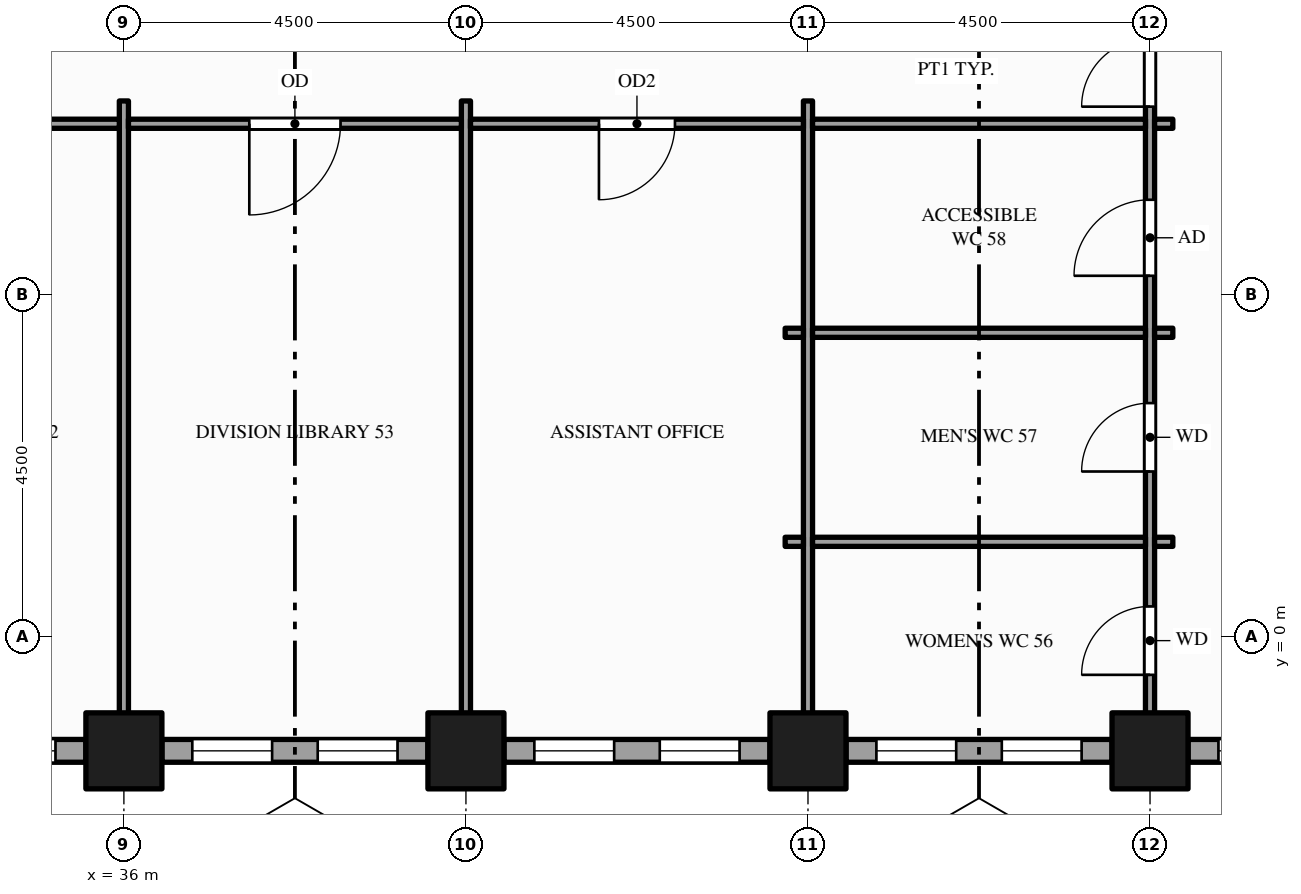
"""IFC4 building model, lengths in metres.
Left out: names, types, materials, properties, quantities, classifications, styles, units other than length and angle.
Written with IfcOpenShell. Run it as: python <this file> out.ifc"""

import sys

from ifc_helpers import new_model, si_unit, direction, frame, frame_2d, origin, origin_2d, place, context, subcontext, project, spatial, rectangle, hollow_rectangle, extrude, element, fill, save


model = new_model("IFC4")
c1 = context("Model", 3, precision=1e-05, world=origin(), true_north=direction((0.0, 1.0)))
c2 = subcontext(c1, "Body", "Model", "MODEL_VIEW")
j1 = project(units=[si_unit("LENGTHUNIT", "METRE"), si_unit("PLANEANGLEUNIT", "RADIAN")], contexts=[c1])
p1 = place(None, origin())
s1 = spatial("IfcSite", under=j1, at=p1, CompositionType="ELEMENT")
p2 = place(p1, origin())
s2 = spatial("IfcBuilding", under=s1, at=p2, CompositionType="ELEMENT")
p3 = place(p2, frame((0.0, 0.0, 107.0)))
s3 = spatial("IfcBuildingStorey", under=s2, at=p3, CompositionType="ELEMENT", Elevation=107.0)
for number, where, z_axis, x_axis in (
    (1, (36.0, -1.5, -0.15), (0.0, 0.0, 1.0), (1.0, 0.0, 0.0)),
    (2, (40.5, -1.5, -0.15), (0.0, 0.0, 1.0), (1.0, 0.0, 0.0)),
    (3, (45.0, -1.5, -0.15), (0.0, 0.0, 1.0), (1.0, 0.0, 0.0)),
    (4, (49.5, -1.5, -0.15), (0.0, 0.0, 1.0), (1.0, 0.0, 0.0)),
):
    element("IfcColumn", number, at=place(p3, frame(where, z_axis=z_axis, x_axis=x_axis)), inside=s3, PredefinedType="COLUMN", context=c2, shape_type="SweptSolid", body=[
        extrude(hollow_rectangle(XDim=1.0, YDim=1.0, WallThickness=0.05, at=origin_2d()), origin(), (0.0, 0.0, 1.0), 4.0),
    ])
p4 = place(p3, frame((32.0, -1.5, 0.0), z_axis=(0.0, 0.0, 1.0), x_axis=(1.0, 0.0, 0.0)))
e5 = element("IfcWall", 5, at=p4, inside=s3, PredefinedType="STANDARD", context=c2, shape_type="SweptSolid", body=[
    extrude(rectangle(XDim=3.5, YDim=0.3, at=frame_2d((1.75, 0.0))), origin(), (0.0, 0.0, 1.0), 3.154),
])
p5 = place(p4, frame((0.4, 0.0, 0.9)))
e6 = element("IfcOpeningElement", 6, at=p5, cuts=e5, PredefinedType="OPENING", context=c2, shape_type="SweptSolid", body=[
    extrude(rectangle(XDim=1.05, YDim=2.0, at=frame_2d((0.525, 1.0))), frame((0.0, 0.16, 0.0), z_axis=(0.0, -1.0, 0.0), x_axis=(1.0, 0.0, 0.0)), (0.0, 0.0, 1.0), 0.32),
])
p6 = place(p4, frame((2.05, 0.0, 0.9)))
e7 = element("IfcOpeningElement", 7, at=p6, cuts=e5, PredefinedType="OPENING", context=c2, shape_type="SweptSolid", body=[
    extrude(rectangle(XDim=1.05, YDim=2.0, at=frame_2d((0.525, 1.0))), frame((0.0, 0.16, 0.0), z_axis=(0.0, -1.0, 0.0), x_axis=(1.0, 0.0, 0.0)), (0.0, 0.0, 1.0), 0.32),
])
p7 = place(p3, frame((36.5, -1.5, 0.0), z_axis=(0.0, 0.0, 1.0), x_axis=(1.0, 0.0, 0.0)))
e8 = element("IfcWall", 8, at=p7, inside=s3, PredefinedType="STANDARD", context=c2, shape_type="SweptSolid", body=[
    extrude(rectangle(XDim=3.5, YDim=0.3, at=frame_2d((1.75, 0.0))), origin(), (0.0, 0.0, 1.0), 3.154),
])
p8 = place(p7, frame((0.4, 0.0, 0.9)))
e9 = element("IfcOpeningElement", 9, at=p8, cuts=e8, PredefinedType="OPENING", context=c2, shape_type="SweptSolid", body=[
    extrude(rectangle(XDim=1.05, YDim=2.0, at=frame_2d((0.525, 1.0))), frame((0.0, 0.16, 0.0), z_axis=(0.0, -1.0, 0.0), x_axis=(1.0, 0.0, 0.0)), (0.0, 0.0, 1.0), 0.32),
])
p9 = place(p7, frame((2.05, 0.0, 0.9)))
e10 = element("IfcOpeningElement", 10, at=p9, cuts=e8, PredefinedType="OPENING", context=c2, shape_type="SweptSolid", body=[
    extrude(rectangle(XDim=1.05, YDim=2.0, at=frame_2d((0.525, 1.0))), frame((0.0, 0.16, 0.0), z_axis=(0.0, -1.0, 0.0), x_axis=(1.0, 0.0, 0.0)), (0.0, 0.0, 1.0), 0.32),
])
p10 = place(p3, frame((41.0, -1.5, 0.0), z_axis=(0.0, 0.0, 1.0), x_axis=(1.0, 0.0, 0.0)))
e11 = element("IfcWall", 11, at=p10, inside=s3, PredefinedType="STANDARD", context=c2, shape_type="SweptSolid", body=[
    extrude(rectangle(XDim=3.5, YDim=0.3, at=frame_2d((1.75, 0.0))), origin(), (0.0, 0.0, 1.0), 3.154),
])
p11 = place(p10, frame((0.4, 0.0, 0.9)))
e12 = element("IfcOpeningElement", 12, at=p11, cuts=e11, PredefinedType="OPENING", context=c2, shape_type="SweptSolid", body=[
    extrude(rectangle(XDim=1.05, YDim=2.0, at=frame_2d((0.525, 1.0))), frame((0.0, 0.16, 0.0), z_axis=(0.0, -1.0, 0.0), x_axis=(1.0, 0.0, 0.0)), (0.0, 0.0, 1.0), 0.32),
])
p12 = place(p10, frame((2.05, 0.0, 0.9)))
e13 = element("IfcOpeningElement", 13, at=p12, cuts=e11, PredefinedType="OPENING", context=c2, shape_type="SweptSolid", body=[
    extrude(rectangle(XDim=1.05, YDim=2.0, at=frame_2d((0.525, 1.0))), frame((0.0, 0.16, 0.0), z_axis=(0.0, -1.0, 0.0), x_axis=(1.0, 0.0, 0.0)), (0.0, 0.0, 1.0), 0.32),
])
p13 = place(p3, frame((45.5, -1.5, 0.0), z_axis=(0.0, 0.0, 1.0), x_axis=(1.0, 0.0, 0.0)))
e14 = element("IfcWall", 14, at=p13, inside=s3, PredefinedType="STANDARD", context=c2, shape_type="SweptSolid", body=[
    extrude(rectangle(XDim=3.5, YDim=0.3, at=frame_2d((1.75, 0.0))), origin(), (0.0, 0.0, 1.0), 3.154),
])
p14 = place(p13, frame((0.4, 0.0, 0.9)))
e15 = element("IfcOpeningElement", 15, at=p14, cuts=e14, PredefinedType="OPENING", context=c2, shape_type="SweptSolid", body=[
    extrude(rectangle(XDim=1.05, YDim=2.0, at=frame_2d((0.525, 1.0))), frame((0.0, 0.16, 0.0), z_axis=(0.0, -1.0, 0.0), x_axis=(1.0, 0.0, 0.0)), (0.0, 0.0, 1.0), 0.32),
])
p15 = place(p13, frame((2.05, 0.0, 0.9)))
e16 = element("IfcOpeningElement", 16, at=p15, cuts=e14, PredefinedType="OPENING", context=c2, shape_type="SweptSolid", body=[
    extrude(rectangle(XDim=1.05, YDim=2.0, at=frame_2d((0.525, 1.0))), frame((0.0, 0.16, 0.0), z_axis=(0.0, -1.0, 0.0), x_axis=(1.0, 0.0, 0.0)), (0.0, 0.0, 1.0), 0.32),
])
p16 = place(p3, frame((50.0, -1.5, 0.0), z_axis=(0.0, 0.0, 1.0), x_axis=(1.0, 0.0, 0.0)))
e17 = element("IfcWall", 17, at=p16, inside=s3, PredefinedType="STANDARD", context=c2, shape_type="SweptSolid", body=[
    extrude(rectangle(XDim=3.5, YDim=0.3, at=frame_2d((1.75, 0.0))), origin(), (0.0, 0.0, 1.0), 3.154),
])
p17 = place(p16, frame((0.4, 0.0, 0.9)))
e18 = element("IfcOpeningElement", 18, at=p17, cuts=e17, PredefinedType="OPENING", context=c2, shape_type="SweptSolid", body=[
    extrude(rectangle(XDim=1.05, YDim=2.0, at=frame_2d((0.525, 1.0))), frame((0.0, 0.16, 0.0), z_axis=(0.0, -1.0, 0.0), x_axis=(1.0, 0.0, 0.0)), (0.0, 0.0, 1.0), 0.32),
])
p18 = place(p16, frame((2.05, 0.0, 0.9)))
e19 = element("IfcOpeningElement", 19, at=p18, cuts=e17, PredefinedType="OPENING", context=c2, shape_type="SweptSolid", body=[
    extrude(rectangle(XDim=1.05, YDim=2.0, at=frame_2d((0.525, 1.0))), frame((0.0, 0.16, 0.0), z_axis=(0.0, -1.0, 0.0), x_axis=(1.0, 0.0, 0.0)), (0.0, 0.0, 1.0), 0.32),
])
for number, where, z_axis, x_axis in (
    (20, (36.0, -1.35, 0.0), (0.0, 0.0, 1.0), (0.0, 1.0, 0.0)),
    (21, (40.5, -1.35, 0.0), (0.0, 0.0, 1.0), (0.0, 1.0, 0.0)),
    (22, (45.0, -1.35, 0.0), (0.0, 0.0, 1.0), (0.0, 1.0, 0.0)),
):
    element("IfcWall", number, at=place(p3, frame(where, z_axis=z_axis, x_axis=x_axis)), inside=s3, PredefinedType="PARTITIONING", context=c2, shape_type="SweptSolid", body=[
        extrude(rectangle(XDim=8.4, YDim=0.12, at=frame_2d((4.2, 0.0))), origin(), (0.0, 0.0, 1.0), 2.938),
    ])
p19 = place(p3, frame((49.5, -1.35, 0.0), z_axis=(0.0, 0.0, 1.0), x_axis=(0.0, 1.0, 0.0)))
e23 = element("IfcWall", 23, at=p19, inside=s3, PredefinedType="PARTITIONING", context=c2, shape_type="SweptSolid", body=[
    extrude(rectangle(XDim=22.2, YDim=0.12, at=frame_2d((11.1, 0.0))), origin(), (0.0, 0.0, 1.0), 2.938),
])
p20 = place(p19, frame((8.325, 0.0, 0.0)))
e24 = element("IfcOpeningElement", 24, at=p20, cuts=e23, PredefinedType="OPENING", context=c2, shape_type="SweptSolid", body=[
    extrude(rectangle(XDim=1.8, YDim=2.1, at=frame_2d((0.9, 1.05))), frame((0.0, 0.07, 0.0), z_axis=(0.0, -1.0, 0.0), x_axis=(1.0, 0.0, 0.0)), (0.0, 0.0, 1.0), 0.14),
])
p21 = place(p19, frame((0.85, 0.0, 0.0)))
e25 = element("IfcOpeningElement", 25, at=p21, cuts=e23, PredefinedType="OPENING", context=c2, shape_type="SweptSolid", body=[
    extrude(rectangle(XDim=0.9, YDim=2.1, at=frame_2d((0.45, 1.05))), frame((0.0, 0.07, 0.0), z_axis=(0.0, -1.0, 0.0), x_axis=(1.0, 0.0, 0.0)), (0.0, 0.0, 1.0), 0.14),
])
p22 = place(p19, frame((3.525, 0.0, 0.0)))
e26 = element("IfcOpeningElement", 26, at=p22, cuts=e23, PredefinedType="OPENING", context=c2, shape_type="SweptSolid", body=[
    extrude(rectangle(XDim=0.9, YDim=2.1, at=frame_2d((0.45, 1.05))), frame((0.0, 0.07, 0.0), z_axis=(0.0, -1.0, 0.0), x_axis=(1.0, 0.0, 0.0)), (0.0, 0.0, 1.0), 0.14),
])
p23 = place(p19, frame((6.1, 0.0, 0.0)))
e27 = element("IfcOpeningElement", 27, at=p23, cuts=e23, PredefinedType="OPENING", context=c2, shape_type="SweptSolid", body=[
    extrude(rectangle(XDim=1.0, YDim=2.1, at=frame_2d((0.5, 1.05))), frame((0.0, 0.07, 0.0), z_axis=(0.0, -1.0, 0.0), x_axis=(1.0, 0.0, 0.0)), (0.0, 0.0, 1.0), 0.14),
])
p24 = place(p3, frame((44.7, 1.25, 0.0), z_axis=(0.0, 0.0, 1.0), x_axis=(1.0, 0.0, 0.0)))
e28 = element("IfcWall", 28, at=p24, inside=s3, PredefinedType="PARTITIONING", context=c2, shape_type="SweptSolid", body=[
    extrude(rectangle(XDim=0.24, YDim=0.12, at=frame_2d((0.12, 0.0))), origin(), (0.0, 0.0, 1.0), 2.938),
])
p25 = place(p3, frame((45.06, 1.25, 0.0), z_axis=(0.0, 0.0, 1.0), x_axis=(1.0, 0.0, 0.0)))
e29 = element("IfcWall", 29, at=p25, inside=s3, PredefinedType="PARTITIONING", context=c2, shape_type="SweptSolid", body=[
    extrude(rectangle(XDim=4.38, YDim=0.12, at=frame_2d((2.19, 0.0))), origin(), (0.0, 0.0, 1.0), 2.938),
])
for number, where, z_axis, x_axis in (
    (30, (49.56, 1.25, 0.0), (0.0, 0.0, 1.0), (1.0, 0.0, 0.0)),
    (31, (44.7, 4.0, 0.0), (0.0, 0.0, 1.0), (1.0, 0.0, 0.0)),
):
    element("IfcWall", number, at=place(p3, frame(where, z_axis=z_axis, x_axis=x_axis)), inside=s3, PredefinedType="PARTITIONING", context=c2, shape_type="SweptSolid", body=[
        extrude(rectangle(XDim=0.24, YDim=0.12, at=frame_2d((0.12, 0.0))), origin(), (0.0, 0.0, 1.0), 2.938),
    ])
p26 = place(p3, frame((45.06, 4.0, 0.0), z_axis=(0.0, 0.0, 1.0), x_axis=(1.0, 0.0, 0.0)))
e32 = element("IfcWall", 32, at=p26, inside=s3, PredefinedType="PARTITIONING", context=c2, shape_type="SweptSolid", body=[
    extrude(rectangle(XDim=4.38, YDim=0.12, at=frame_2d((2.19, 0.0))), origin(), (0.0, 0.0, 1.0), 2.938),
])
p27 = place(p3, frame((49.56, 4.0, 0.0), z_axis=(0.0, 0.0, 1.0), x_axis=(1.0, 0.0, 0.0)))
e33 = element("IfcWall", 33, at=p27, inside=s3, PredefinedType="PARTITIONING", context=c2, shape_type="SweptSolid", body=[
    extrude(rectangle(XDim=0.24, YDim=0.12, at=frame_2d((0.12, 0.0))), origin(), (0.0, 0.0, 1.0), 2.938),
])
p28 = place(p3, frame((31.56, 6.75, 0.0), z_axis=(0.0, 0.0, 1.0), x_axis=(1.0, 0.0, 0.0)))
e34 = element("IfcWall", 34, at=p28, inside=s3, PredefinedType="PARTITIONING", context=c2, shape_type="SweptSolid", body=[
    extrude(rectangle(XDim=4.38, YDim=0.12, at=frame_2d((2.19, 0.0))), origin(), (0.0, 0.0, 1.0), 2.938),
])
p29 = place(p28, frame((1.59, 0.0, 0.0)))
e35 = element("IfcOpeningElement", 35, at=p29, cuts=e34, PredefinedType="OPENING", context=c2, shape_type="SweptSolid", body=[
    extrude(rectangle(XDim=1.2, YDim=2.1, at=frame_2d((0.6, 1.05))), frame((0.0, 0.07, 0.0), z_axis=(0.0, -1.0, 0.0), x_axis=(1.0, 0.0, 0.0)), (0.0, 0.0, 1.0), 0.14),
])
p30 = place(p3, frame((36.06, 6.75, 0.0), z_axis=(0.0, 0.0, 1.0), x_axis=(1.0, 0.0, 0.0)))
e36 = element("IfcWall", 36, at=p30, inside=s3, PredefinedType="PARTITIONING", context=c2, shape_type="SweptSolid", body=[
    extrude(rectangle(XDim=4.38, YDim=0.12, at=frame_2d((2.19, 0.0))), origin(), (0.0, 0.0, 1.0), 2.938),
])
p31 = place(p30, frame((1.59, 0.0, 0.0)))
e37 = element("IfcOpeningElement", 37, at=p31, cuts=e36, PredefinedType="OPENING", context=c2, shape_type="SweptSolid", body=[
    extrude(rectangle(XDim=1.2, YDim=2.1, at=frame_2d((0.6, 1.05))), frame((0.0, 0.07, 0.0), z_axis=(0.0, -1.0, 0.0), x_axis=(1.0, 0.0, 0.0)), (0.0, 0.0, 1.0), 0.14),
])
p32 = place(p3, frame((40.56, 6.75, 0.0), z_axis=(0.0, 0.0, 1.0), x_axis=(1.0, 0.0, 0.0)))
e38 = element("IfcWall", 38, at=p32, inside=s3, PredefinedType="PARTITIONING", context=c2, shape_type="SweptSolid", body=[
    extrude(rectangle(XDim=4.38, YDim=0.12, at=frame_2d((2.19, 0.0))), origin(), (0.0, 0.0, 1.0), 2.938),
])
p33 = place(p32, frame((1.69, 0.0, 0.0)))
e39 = element("IfcOpeningElement", 39, at=p33, cuts=e38, PredefinedType="OPENING", context=c2, shape_type="SweptSolid", body=[
    extrude(rectangle(XDim=1.0, YDim=2.1, at=frame_2d((0.5, 1.05))), frame((0.0, 0.07, 0.0), z_axis=(0.0, -1.0, 0.0), x_axis=(1.0, 0.0, 0.0)), (0.0, 0.0, 1.0), 0.14),
])
p34 = place(p3, frame((45.06, 6.75, 0.0), z_axis=(0.0, 0.0, 1.0), x_axis=(1.0, 0.0, 0.0)))
e40 = element("IfcWall", 40, at=p34, inside=s3, PredefinedType="PARTITIONING", context=c2, shape_type="SweptSolid", body=[
    extrude(rectangle(XDim=4.38, YDim=0.12, at=frame_2d((2.19, 0.0))), origin(), (0.0, 0.0, 1.0), 2.938),
])
p35 = place(p3, frame((49.56, 6.75, 0.0), z_axis=(0.0, 0.0, 1.0), x_axis=(1.0, 0.0, 0.0)))
e41 = element("IfcWall", 41, at=p35, inside=s3, PredefinedType="PARTITIONING", context=c2, shape_type="SweptSolid", body=[
    extrude(rectangle(XDim=0.24, YDim=0.12, at=frame_2d((0.12, 0.0))), origin(), (0.0, 0.0, 1.0), 2.938),
])
p36 = place(p6, origin())
e42 = element("IfcWindow", 42, at=p36, inside=s3, PartitioningType="SINGLE_PANEL", PredefinedType="WINDOW", context=c2, shape_type="SweptSolid", body=[
    extrude(rectangle(XDim=1.05, YDim=2.0, at=frame_2d((0.525, 1.0))), frame((0.0, 0.03, 0.0), z_axis=(0.0, -1.0, 0.0), x_axis=(1.0, 0.0, 0.0)), (0.0, 0.0, 1.0), 0.06),
])
fill(e7, e42)
p37 = place(p8, origin())
e43 = element("IfcWindow", 43, at=p37, inside=s3, PartitioningType="SINGLE_PANEL", PredefinedType="WINDOW", context=c2, shape_type="SweptSolid", body=[
    extrude(rectangle(XDim=1.05, YDim=2.0, at=frame_2d((0.525, 1.0))), frame((0.0, 0.03, 0.0), z_axis=(0.0, -1.0, 0.0), x_axis=(1.0, 0.0, 0.0)), (0.0, 0.0, 1.0), 0.06),
])
fill(e9, e43)
p38 = place(p9, origin())
e44 = element("IfcWindow", 44, at=p38, inside=s3, PartitioningType="SINGLE_PANEL", PredefinedType="WINDOW", context=c2, shape_type="SweptSolid", body=[
    extrude(rectangle(XDim=1.05, YDim=2.0, at=frame_2d((0.525, 1.0))), frame((0.0, 0.03, 0.0), z_axis=(0.0, -1.0, 0.0), x_axis=(1.0, 0.0, 0.0)), (0.0, 0.0, 1.0), 0.06),
])
fill(e10, e44)
p39 = place(p11, origin())
e45 = element("IfcWindow", 45, at=p39, inside=s3, PartitioningType="SINGLE_PANEL", PredefinedType="WINDOW", context=c2, shape_type="SweptSolid", body=[
    extrude(rectangle(XDim=1.05, YDim=2.0, at=frame_2d((0.525, 1.0))), frame((0.0, 0.03, 0.0), z_axis=(0.0, -1.0, 0.0), x_axis=(1.0, 0.0, 0.0)), (0.0, 0.0, 1.0), 0.06),
])
fill(e12, e45)
p40 = place(p12, origin())
e46 = element("IfcWindow", 46, at=p40, inside=s3, PartitioningType="SINGLE_PANEL", PredefinedType="WINDOW", context=c2, shape_type="SweptSolid", body=[
    extrude(rectangle(XDim=1.05, YDim=2.0, at=frame_2d((0.525, 1.0))), frame((0.0, 0.03, 0.0), z_axis=(0.0, -1.0, 0.0), x_axis=(1.0, 0.0, 0.0)), (0.0, 0.0, 1.0), 0.06),
])
fill(e13, e46)
p41 = place(p14, origin())
e47 = element("IfcWindow", 47, at=p41, inside=s3, PartitioningType="SINGLE_PANEL", PredefinedType="WINDOW", context=c2, shape_type="SweptSolid", body=[
    extrude(rectangle(XDim=1.05, YDim=2.0, at=frame_2d((0.525, 1.0))), frame((0.0, 0.03, 0.0), z_axis=(0.0, -1.0, 0.0), x_axis=(1.0, 0.0, 0.0)), (0.0, 0.0, 1.0), 0.06),
])
fill(e15, e47)
p42 = place(p15, origin())
e48 = element("IfcWindow", 48, at=p42, inside=s3, PartitioningType="SINGLE_PANEL", PredefinedType="WINDOW", context=c2, shape_type="SweptSolid", body=[
    extrude(rectangle(XDim=1.05, YDim=2.0, at=frame_2d((0.525, 1.0))), frame((0.0, 0.03, 0.0), z_axis=(0.0, -1.0, 0.0), x_axis=(1.0, 0.0, 0.0)), (0.0, 0.0, 1.0), 0.06),
])
fill(e16, e48)
p43 = place(p17, origin())
e49 = element("IfcWindow", 49, at=p43, inside=s3, PartitioningType="SINGLE_PANEL", PredefinedType="WINDOW", context=c2, shape_type="SweptSolid", body=[
    extrude(rectangle(XDim=1.05, YDim=2.0, at=frame_2d((0.525, 1.0))), frame((0.0, 0.03, 0.0), z_axis=(0.0, -1.0, 0.0), x_axis=(1.0, 0.0, 0.0)), (0.0, 0.0, 1.0), 0.06),
])
fill(e18, e49)
p44 = place(p20, origin())
e50 = element("IfcDoor", 50, at=p44, inside=s3, OperationType="DOUBLE_DOOR_SINGLE_SWING", PredefinedType="DOOR", context=c2, shape_type="SweptSolid", body=[
    extrude(rectangle(XDim=1.8, YDim=2.1, at=frame_2d((0.9, 1.05))), frame((0.0, 0.025, 0.0), z_axis=(0.0, -1.0, 0.0), x_axis=(1.0, 0.0, 0.0)), (0.0, 0.0, 1.0), 0.05),
])
fill(e24, e50)
p45 = place(p31, origin())
e51 = element("IfcDoor", 51, at=p45, inside=s3, OperationType="SINGLE_SWING_LEFT", PredefinedType="DOOR", context=c2, shape_type="SweptSolid", body=[
    extrude(rectangle(XDim=1.2, YDim=2.1, at=frame_2d((0.6, 1.05))), frame((0.0, 0.025, 0.0), z_axis=(0.0, -1.0, 0.0), x_axis=(1.0, 0.0, 0.0)), (0.0, 0.0, 1.0), 0.05),
])
fill(e37, e51)
p46 = place(p33, origin())
e52 = element("IfcDoor", 52, at=p46, inside=s3, OperationType="SINGLE_SWING_LEFT", PredefinedType="DOOR", context=c2, shape_type="SweptSolid", body=[
    extrude(rectangle(XDim=1.0, YDim=2.1, at=frame_2d((0.5, 1.05))), frame((0.0, 0.025, 0.0), z_axis=(0.0, -1.0, 0.0), x_axis=(1.0, 0.0, 0.0)), (0.0, 0.0, 1.0), 0.05),
])
fill(e39, e52)
p47 = place(p21, origin())
e53 = element("IfcDoor", 53, at=p47, inside=s3, OperationType="SINGLE_SWING_LEFT", PredefinedType="DOOR", context=c2, shape_type="SweptSolid", body=[
    extrude(rectangle(XDim=0.9, YDim=2.1, at=frame_2d((0.45, 1.05))), frame((0.0, 0.025, 0.0), z_axis=(0.0, -1.0, 0.0), x_axis=(1.0, 0.0, 0.0)), (0.0, 0.0, 1.0), 0.05),
])
fill(e25, e53)
p48 = place(p22, origin())
e54 = element("IfcDoor", 54, at=p48, inside=s3, OperationType="SINGLE_SWING_LEFT", PredefinedType="DOOR", context=c2, shape_type="SweptSolid", body=[
    extrude(rectangle(XDim=0.9, YDim=2.1, at=frame_2d((0.45, 1.05))), frame((0.0, 0.025, 0.0), z_axis=(0.0, -1.0, 0.0), x_axis=(1.0, 0.0, 0.0)), (0.0, 0.0, 1.0), 0.05),
])
fill(e26, e54)
p49 = place(p23, origin())
e55 = element("IfcDoor", 55, at=p49, inside=s3, OperationType="SINGLE_SWING_LEFT", PredefinedType="DOOR", context=c2, shape_type="SweptSolid", body=[
    extrude(rectangle(XDim=1.0, YDim=2.1, at=frame_2d((0.5, 1.05))), frame((0.0, 0.025, 0.0), z_axis=(0.0, -1.0, 0.0), x_axis=(1.0, 0.0, 0.0)), (0.0, 0.0, 1.0), 0.05),
])
fill(e27, e55)
save(model, sys.argv[1])
